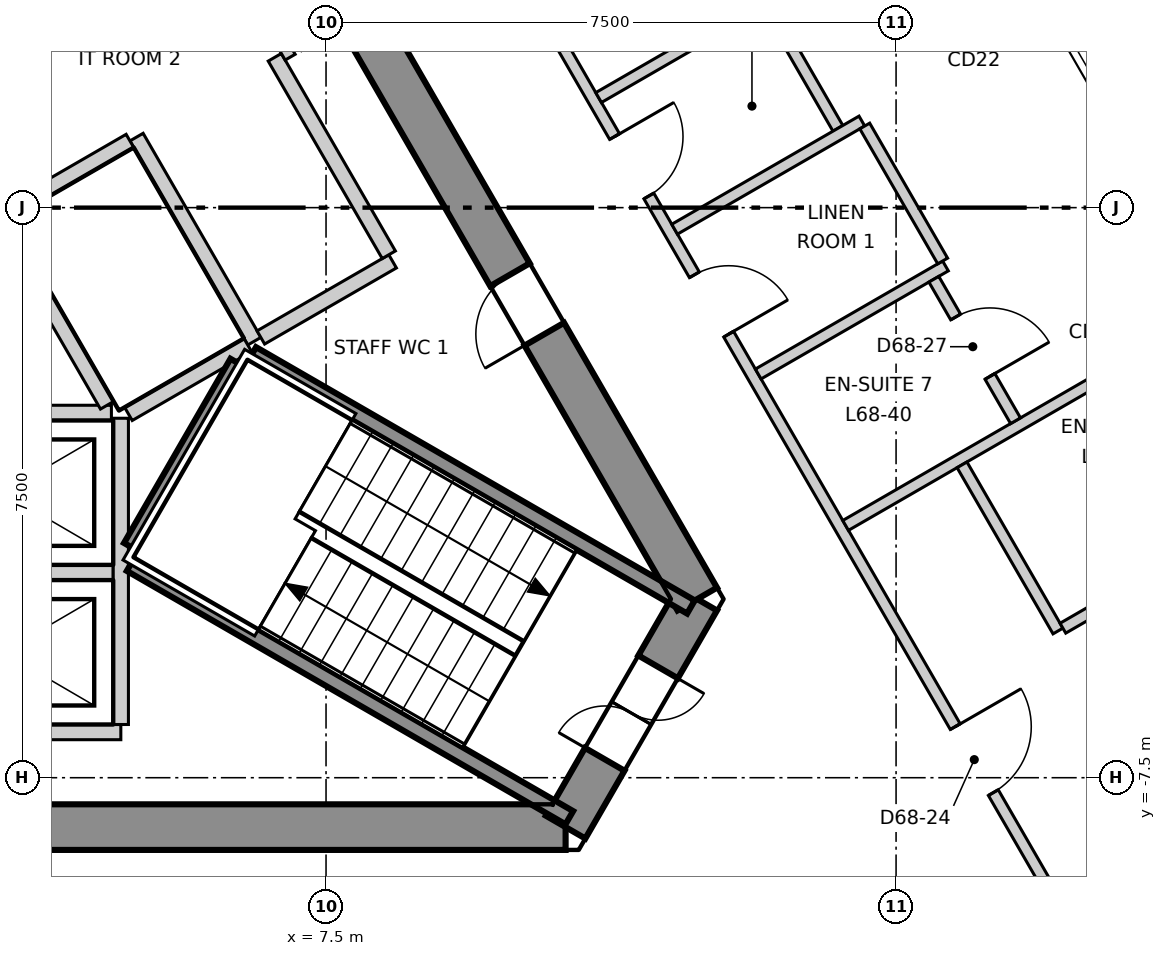
"""IFC4 building model, lengths in metres.
Left out: names, types, materials, properties, quantities, classifications, styles, units other than length and angle.
Written with IfcOpenShell. Run it as: python <this file> out.ifc"""

import sys

from ifc_helpers import new_model, si_unit, direction, frame, frame_2d, origin, place, context, subcontext, project, spatial, polyline, rectangle, outline, extrude, element, fill, save


model = new_model("IFC4")
c1 = context("Model", 3, precision=1e-05, world=origin(), true_north=direction((0.0, 1.0)))
c2 = subcontext(c1, "Body", "Model", "MODEL_VIEW")
j1 = project(units=[si_unit("LENGTHUNIT", "METRE"), si_unit("PLANEANGLEUNIT", "RADIAN")], contexts=[c1])
p1 = place(None, origin())
s1 = spatial("IfcSite", under=j1, at=p1, CompositionType="ELEMENT")
p2 = place(p1, origin())
s2 = spatial("IfcBuilding", under=s1, at=p2, CompositionType="ELEMENT")
p3 = place(p2, frame((0.0, 0.0, 289.9)))
s3 = spatial("IfcBuildingStorey", under=s2, at=p3, CompositionType="ELEMENT", Elevation=289.9)
p4 = place(p3, frame((-10.652, -8.15, -0.3), z_axis=(0.0, 0.0, 1.0), x_axis=(1.0, 0.0, 0.0)))
e1 = element("IfcWall", 1, at=p4, inside=s3, PredefinedType="SHEAR", context=c2, shape_type="SweptSolid", body=[
    extrude(outline(polyline([(-0.173, -0.3), (1.795, -0.3), (3.763, -0.3), (5.731, -0.3), (7.7, -0.3), (9.668, -0.3), (11.636, -0.3), (13.604, -0.3), (15.573, -0.3), (17.541, -0.3), (19.509, -0.3), (21.477, -0.3), (21.131, 0.3), (19.226, 0.3), (17.321, 0.3), (15.415, 0.3), (13.51, 0.3), (11.605, 0.3), (9.699, 0.3), (7.794, 0.3), (5.889, 0.3), (3.984, 0.3), (2.078, 0.3), (0.173, 0.3), (-0.173, -0.3)])), origin(), (0.0, 0.0, 1.0), 3.6),
])
p5 = place(p4, frame((9.752, 0.0, 0.3)))
e2 = element("IfcOpeningElement", 2, at=p5, cuts=e1, PredefinedType="OPENING", context=c2, shape_type="SweptSolid", body=[
    extrude(rectangle(XDim=1.8, YDim=2.1, at=frame_2d((0.9, 1.05))), frame((0.0, 0.31, 0.0), z_axis=(0.0, -1.0, 0.0), x_axis=(1.0, 0.0, 0.0)), (0.0, 0.0, 1.0), 0.62),
])
p6 = place(p4, frame((4.156, 0.0, 0.3)))
e3 = element("IfcOpeningElement", 3, at=p6, cuts=e1, PredefinedType="OPENING", context=c2, shape_type="SweptSolid", body=[
    extrude(rectangle(XDim=0.9, YDim=2.1, at=frame_2d((0.45, 1.05))), frame((0.0, 0.31, 0.0), z_axis=(0.0, -1.0, 0.0), x_axis=(1.0, 0.0, 0.0)), (0.0, 0.0, 1.0), 0.62),
])
p7 = place(p3, frame((10.652, -8.15, -0.3), z_axis=(0.0, 0.0, 1.0), x_axis=(0.49997462182, 0.866040055388, 0.0)))
e4 = element("IfcWall", 4, at=p7, inside=s3, PredefinedType="SHEAR", context=c2, shape_type="SweptSolid", body=[
    extrude(outline(polyline([(-0.173, -0.3), (1.732, -0.301), (3.638, -0.301), (3.291, 0.3), (1.732, 0.3), (0.173, 0.3), (-0.173, -0.3)])), origin(), (0.0, 0.0, 1.0), 3.6),
])
p8 = place(p7, frame((1.032, 0.0, 0.3)))
e5 = element("IfcOpeningElement", 5, at=p8, cuts=e4, PredefinedType="OPENING", context=c2, shape_type="SweptSolid", body=[
    extrude(rectangle(XDim=1.4, YDim=2.1, at=frame_2d((0.7, 1.05))), frame((0.0, 0.31, 0.0), z_axis=(0.0, -1.0, 0.0), x_axis=(1.0, 0.0, 0.0)), (0.0, 0.0, 1.0), 0.621),
])
p9 = place(p3, frame((12.384, -5.15, -0.3), z_axis=(0.0, 0.0, 1.0), x_axis=(-0.500000539815, 0.866025092122, 0.0)))
e6 = element("IfcWall", 6, at=p9, inside=s3, PredefinedType="SHEAR", context=c2, shape_type="SweptSolid", body=[
    extrude(outline(polyline([(-0.173, -0.301), (1.795, -0.301), (3.763, -0.301), (5.731, -0.301), (7.7, -0.301), (9.668, -0.301), (11.636, -0.301), (13.604, -0.3), (15.573, -0.3), (17.541, -0.3), (19.509, -0.3), (21.477, -0.3), (21.131, 0.3), (19.226, 0.3), (17.321, 0.3), (15.415, 0.3), (13.51, 0.3), (11.605, 0.3), (9.699, 0.3), (7.794, 0.3), (5.889, 0.3), (3.984, 0.3), (2.078, 0.3), (0.173, 0.3), (-0.173, -0.301)])), origin(), (0.0, 0.0, 1.0), 3.6),
])
p10 = place(p9, frame((16.378, 0.0, 0.3)))
e7 = element("IfcOpeningElement", 7, at=p10, cuts=e6, PredefinedType="OPENING", context=c2, shape_type="SweptSolid", body=[
    extrude(rectangle(XDim=0.9, YDim=2.1, at=frame_2d((0.45, 1.05))), frame((0.0, 0.31, 0.0), z_axis=(0.0, -1.0, 0.0), x_axis=(1.0, 0.0, 0.0)), (0.0, 0.0, 1.0), 0.621),
])
p11 = place(p9, frame((4.026, 0.0, 0.3)))
e8 = element("IfcOpeningElement", 8, at=p11, cuts=e6, PredefinedType="OPENING", context=c2, shape_type="SweptSolid", body=[
    extrude(rectangle(XDim=0.9, YDim=2.1, at=frame_2d((0.45, 1.05))), frame((0.0, 0.31, 0.0), z_axis=(0.0, -1.0, 0.0), x_axis=(1.0, 0.0, 0.0)), (0.0, 0.0, 1.0), 0.621),
])
p12 = place(p3, frame((25.375, -11.77, 0.0), z_axis=(0.0, 0.0, 1.0), x_axis=(-0.500008134474, 0.866020707292, 0.0)))
e9 = element("IfcWall", 9, at=p12, inside=s3, PredefinedType="ELEMENTEDWALL", context=c2, shape_type="SweptSolid", body=[
    extrude(rectangle(XDim=45.741, YDim=0.2, at=frame_2d((22.871, 0.0))), origin(), (0.0, 0.0, 1.0), 3.3),
])
p13 = place(p12, frame((2.15, 0.0, 0.9)))
e10 = element("IfcOpeningElement", 10, at=p13, cuts=e9, PredefinedType="OPENING", context=c2, shape_type="SweptSolid", body=[
    extrude(rectangle(XDim=3.7, YDim=2.2, at=frame_2d((1.85, 1.1))), frame((0.0, 0.11, 0.0), z_axis=(0.0, -1.0, 0.0), x_axis=(1.0, 0.0, 0.0)), (0.0, 0.0, 1.0), 0.22),
])
p14 = place(p12, frame((7.544, 0.0, 0.9)))
e11 = element("IfcOpeningElement", 11, at=p14, cuts=e9, PredefinedType="OPENING", context=c2, shape_type="SweptSolid", body=[
    extrude(rectangle(XDim=3.7, YDim=2.2, at=frame_2d((1.85, 1.1))), frame((0.0, 0.11, 0.0), z_axis=(0.0, -1.0, 0.0), x_axis=(1.0, 0.0, 0.0)), (0.0, 0.0, 1.0), 0.22),
])
p15 = place(p12, frame((12.939, 0.0, 0.9)))
e12 = element("IfcOpeningElement", 12, at=p15, cuts=e9, PredefinedType="OPENING", context=c2, shape_type="SweptSolid", body=[
    extrude(rectangle(XDim=3.7, YDim=2.2, at=frame_2d((1.85, 1.1))), frame((0.0, 0.11, 0.0), z_axis=(0.0, -1.0, 0.0), x_axis=(1.0, 0.0, 0.0)), (0.0, 0.0, 1.0), 0.22),
])
p16 = place(p12, frame((18.333, 0.0, 0.9)))
e13 = element("IfcOpeningElement", 13, at=p16, cuts=e9, PredefinedType="OPENING", context=c2, shape_type="SweptSolid", body=[
    extrude(rectangle(XDim=3.7, YDim=2.2, at=frame_2d((1.85, 1.1))), frame((0.0, 0.11, 0.0), z_axis=(0.0, -1.0, 0.0), x_axis=(1.0, 0.0, 0.0)), (0.0, 0.0, 1.0), 0.22),
])
p17 = place(p12, frame((23.728, 0.0, 0.9)))
e14 = element("IfcOpeningElement", 14, at=p17, cuts=e9, PredefinedType="OPENING", context=c2, shape_type="SweptSolid", body=[
    extrude(rectangle(XDim=3.7, YDim=2.2, at=frame_2d((1.85, 1.1))), frame((0.0, 0.11, 0.0), z_axis=(0.0, -1.0, 0.0), x_axis=(1.0, 0.0, 0.0)), (0.0, 0.0, 1.0), 0.22),
])
p18 = place(p12, frame((29.122, 0.0, 0.9)))
e15 = element("IfcOpeningElement", 15, at=p18, cuts=e9, PredefinedType="OPENING", context=c2, shape_type="SweptSolid", body=[
    extrude(rectangle(XDim=3.7, YDim=2.2, at=frame_2d((1.85, 1.1))), frame((0.0, 0.11, 0.0), z_axis=(0.0, -1.0, 0.0), x_axis=(1.0, 0.0, 0.0)), (0.0, 0.0, 1.0), 0.22),
])
p19 = place(p12, frame((34.517, 0.0, 0.9)))
e16 = element("IfcOpeningElement", 16, at=p19, cuts=e9, PredefinedType="OPENING", context=c2, shape_type="SweptSolid", body=[
    extrude(rectangle(XDim=3.7, YDim=2.2, at=frame_2d((1.85, 1.1))), frame((0.0, 0.11, 0.0), z_axis=(0.0, -1.0, 0.0), x_axis=(1.0, 0.0, 0.0)), (0.0, 0.0, 1.0), 0.22),
])
p20 = place(p12, frame((39.911, 0.0, 0.9)))
e17 = element("IfcOpeningElement", 17, at=p20, cuts=e9, PredefinedType="OPENING", context=c2, shape_type="SweptSolid", body=[
    extrude(rectangle(XDim=3.7, YDim=2.2, at=frame_2d((1.85, 1.1))), frame((0.0, 0.11, 0.0), z_axis=(0.0, -1.0, 0.0), x_axis=(1.0, 0.0, 0.0)), (0.0, 0.0, 1.0), 0.22),
])
p21 = place(p3, frame((0.075, 20.37, 0.0), z_axis=(0.0, 0.0, 1.0), x_axis=(0.500009775255, -0.866019759965, 0.0)))
e18 = element("IfcWall", 18, at=p21, inside=s3, PredefinedType="PARTITIONING", context=c2, shape_type="SweptSolid", body=[
    extrude(rectangle(XDim=35.207, YDim=0.15, at=frame_2d((17.604, 0.0))), origin(), (0.0, 0.0, 1.0), 3.3),
])
p22 = place(p21, frame((31.407, 0.0, 0.0)))
e19 = element("IfcOpeningElement", 19, at=p22, cuts=e18, PredefinedType="OPENING", context=c2, shape_type="SweptSolid", body=[
    extrude(rectangle(XDim=1.0, YDim=2.1, at=frame_2d((0.5, 1.05))), frame((0.0, 0.085, 0.0), z_axis=(0.0, -1.0, 0.0), x_axis=(1.0, 0.0, 0.0)), (0.0, 0.0, 1.0), 0.17),
])
p23 = place(p21, frame((19.243, 0.0, 0.0)))
e20 = element("IfcOpeningElement", 20, at=p23, cuts=e18, PredefinedType="OPENING", context=c2, shape_type="SweptSolid", body=[
    extrude(rectangle(XDim=1.0, YDim=2.1, at=frame_2d((0.5, 1.05))), frame((0.0, 0.085, 0.0), z_axis=(0.0, -1.0, 0.0), x_axis=(1.0, 0.0, 0.0)), (0.0, 0.0, 1.0), 0.17),
])
p24 = place(p21, frame((24.543, 0.0, 0.0)))
e21 = element("IfcOpeningElement", 21, at=p24, cuts=e18, PredefinedType="OPENING", context=c2, shape_type="SweptSolid", body=[
    extrude(rectangle(XDim=0.9, YDim=2.1, at=frame_2d((0.45, 1.05))), frame((0.0, 0.085, 0.0), z_axis=(0.0, -1.0, 0.0), x_axis=(1.0, 0.0, 0.0)), (0.0, 0.0, 1.0), 0.17),
])
p25 = place(p21, frame((22.443, 0.0, 0.0)))
e22 = element("IfcOpeningElement", 22, at=p25, cuts=e18, PredefinedType="OPENING", context=c2, shape_type="SweptSolid", body=[
    extrude(rectangle(XDim=0.9, YDim=2.1, at=frame_2d((0.45, 1.05))), frame((0.0, 0.085, 0.0), z_axis=(0.0, -1.0, 0.0), x_axis=(1.0, 0.0, 0.0)), (0.0, 0.0, 1.0), 0.17),
])
p26 = place(p21, frame((13.253, 0.0, 0.0)))
e23 = element("IfcOpeningElement", 23, at=p26, cuts=e18, PredefinedType="OPENING", context=c2, shape_type="SweptSolid", body=[
    extrude(rectangle(XDim=1.0, YDim=2.1, at=frame_2d((0.5, 1.05))), frame((0.0, 0.085, 0.0), z_axis=(0.0, -1.0, 0.0), x_axis=(1.0, 0.0, 0.0)), (0.0, 0.0, 1.0), 0.17),
])
p27 = place(p21, frame((5.559, 0.0, 0.0)))
e24 = element("IfcOpeningElement", 24, at=p27, cuts=e18, PredefinedType="OPENING", context=c2, shape_type="SweptSolid", body=[
    extrude(rectangle(XDim=1.0, YDim=2.1, at=frame_2d((0.5, 1.05))), frame((0.0, 0.085, 0.0), z_axis=(0.0, -1.0, 0.0), x_axis=(1.0, 0.0, 0.0)), (0.0, 0.0, 1.0), 0.17),
])
p28 = place(p3, frame((13.273, 2.711, 0.0), z_axis=(0.0, 0.0, 1.0), x_axis=(0.499671230855, -0.86621513555, 0.0)))
e25 = element("IfcWall", 25, at=p28, inside=s3, PredefinedType="PARTITIONING", context=c2, shape_type="SweptSolid", body=[
    extrude(rectangle(XDim=1.926, YDim=0.15, at=frame_2d((0.963, 0.0))), origin(), (0.0, 0.0, 1.0), 3.3),
])
p29 = place(p3, frame((11.086, 1.448, 0.0), z_axis=(0.0, 0.0, 1.0), x_axis=(0.8660395779, 0.499975448907, 0.0)))
e26 = element("IfcWall", 26, at=p29, inside=s3, PredefinedType="PARTITIONING", context=c2, shape_type="SweptSolid", body=[
    extrude(rectangle(XDim=2.45, YDim=0.15, at=frame_2d((1.225, 0.0))), origin(), (0.0, 0.0, 1.0), 3.3),
])
p30 = place(p3, frame((12.086, -0.284, 0.0), z_axis=(0.0, 0.0, 1.0), x_axis=(0.865995540999, 0.500051720295, 0.0)))
e27 = element("IfcWall", 27, at=p30, inside=s3, PredefinedType="PARTITIONING", context=c2, shape_type="SweptSolid", body=[
    extrude(rectangle(XDim=2.845, YDim=0.15, at=frame_2d((1.423, 0.0))), origin(), (0.0, 0.0, 1.0), 3.3),
])
p31 = place(p3, frame((13.186, -2.189, 0.0), z_axis=(0.0, 0.0, 1.0), x_axis=(0.866122712398, 0.499831418649, 0.0)))
e28 = element("IfcWall", 28, at=p31, inside=s3, PredefinedType="PARTITIONING", context=c2, shape_type="SweptSolid", body=[
    extrude(rectangle(XDim=2.845, YDim=0.15, at=frame_2d((1.422, 0.0))), origin(), (0.0, 0.0, 1.0), 3.3),
])
p32 = place(p3, frame((14.336, -4.181, 0.0), z_axis=(0.0, 0.0, 1.0), x_axis=(0.86606758311, 0.499926936147, 0.0)))
e29 = element("IfcWall", 29, at=p32, inside=s3, PredefinedType="PARTITIONING", context=c2, shape_type="SweptSolid", body=[
    extrude(rectangle(XDim=5.684, YDim=0.15, at=frame_2d((2.842, 0.0))), origin(), (0.0, 0.0, 1.0), 3.3),
])
p33 = place(p3, frame((14.588, 1.074, 0.0), z_axis=(0.0, 0.0, 1.0), x_axis=(0.499942325911, -0.866058699375, 0.0)))
e30 = element("IfcWall", 30, at=p33, inside=s3, PredefinedType="PARTITIONING", context=c2, shape_type="SweptSolid", body=[
    extrude(rectangle(XDim=2.051, YDim=0.15, at=frame_2d((1.025, 0.0))), origin(), (0.0, 0.0, 1.0), 3.3),
])
p34 = place(p3, frame((15.497, -0.942, 0.0), z_axis=(0.0, 0.0, 1.0), x_axis=(0.499961633463, -0.866047553582, 0.0)))
e31 = element("IfcWall", 31, at=p34, inside=s3, PredefinedType="PARTITIONING", context=c2, shape_type="SweptSolid", body=[
    extrude(rectangle(XDim=2.15, YDim=0.15, at=frame_2d((1.075, 0.0))), origin(), (0.0, 0.0, 1.0), 3.3),
])
p35 = place(p34, frame((0.575, 0.0, 0.0)))
e32 = element("IfcOpeningElement", 32, at=p35, cuts=e31, PredefinedType="OPENING", context=c2, shape_type="SweptSolid", body=[
    extrude(rectangle(XDim=0.9, YDim=2.1, at=frame_2d((0.45, 1.05))), frame((0.0, 0.085, 0.0), z_axis=(0.0, -1.0, 0.0), x_axis=(1.0, 0.0, 0.0)), (0.0, 0.0, 1.0), 0.17),
])
p36 = place(p3, frame((15.868, -3.384, 0.0), z_axis=(0.0, 0.0, 1.0), x_axis=(0.499956887143, -0.866050293573, 0.0)))
e33 = element("IfcWall", 33, at=p36, inside=s3, PredefinedType="PARTITIONING", context=c2, shape_type="SweptSolid", body=[
    extrude(rectangle(XDim=2.524, YDim=0.15, at=frame_2d((1.262, 0.0))), origin(), (0.0, 0.0, 1.0), 3.3),
])
p37 = place(p3, frame((17.195, -5.533, 0.0), z_axis=(0.0, 0.0, 1.0), x_axis=(0.866027073272, 0.499997108352, 0.0)))
e34 = element("IfcWall", 34, at=p37, inside=s3, PredefinedType="PARTITIONING", context=c2, shape_type="SweptSolid", body=[
    extrude(rectangle(XDim=2.77, YDim=0.15, at=frame_2d((1.385, 0.0))), origin(), (0.0, 0.0, 1.0), 3.3),
])
p38 = place(p37, frame((0.895, 0.0, 0.0)))
e35 = element("IfcOpeningElement", 35, at=p38, cuts=e34, PredefinedType="OPENING", context=c2, shape_type="SweptSolid", body=[
    extrude(rectangle(XDim=0.9, YDim=2.1, at=frame_2d((0.45, 1.05))), frame((0.0, 0.085, 0.0), z_axis=(0.0, -1.0, 0.0), x_axis=(1.0, 0.0, 0.0)), (0.0, 0.0, 1.0), 0.17),
])
p39 = place(p3, frame((1.8, -6.9, 0.0), z_axis=(0.0, 0.0, 1.0), x_axis=(1.0, 0.0, 0.0)))
e36 = element("IfcWall", 36, at=p39, inside=s3, PredefinedType="SOLIDWALL", context=c2, shape_type="SweptSolid", body=[
    extrude(rectangle(XDim=3.0, YDim=0.2, at=frame_2d((1.5, 0.0))), origin(), (0.0, 0.0, 1.0), 3.3),
])
p40 = place(p3, frame((1.8, -4.8, 0.0), z_axis=(0.0, 0.0, 1.0), x_axis=(1.0, 0.0, 0.0)))
e37 = element("IfcWall", 37, at=p40, inside=s3, PredefinedType="SOLIDWALL", context=c2, shape_type="SweptSolid", body=[
    extrude(rectangle(XDim=2.9, YDim=0.2, at=frame_2d((1.45, 0.0))), origin(), (0.0, 0.0, 1.0), 3.3),
])
p41 = place(p3, frame((1.703, -2.7, 0.0), z_axis=(0.0, 0.0, 1.0), x_axis=(1.0, 0.0, 0.0)))
e38 = element("IfcWall", 38, at=p41, inside=s3, PredefinedType="SOLIDWALL", context=c2, shape_type="SweptSolid", body=[
    extrude(rectangle(XDim=2.973, YDim=0.2, at=frame_2d((1.487, 0.0))), origin(), (0.0, 0.0, 1.0), 3.3),
])
p42 = place(p41, frame((0.936, 0.0, 0.0)))
e39 = element("IfcOpeningElement", 39, at=p42, cuts=e38, PredefinedType="OPENING", context=c2, shape_type="SweptSolid", body=[
    extrude(rectangle(XDim=1.1, YDim=2.1, at=frame_2d((0.55, 1.05))), frame((0.0, 0.11, 0.0), z_axis=(0.0, -1.0, 0.0), x_axis=(1.0, 0.0, 0.0)), (0.0, 0.0, 1.0), 0.22),
])
p43 = place(p3, frame((3.19, -0.125, 0.0), z_axis=(0.0, 0.0, 1.0), x_axis=(0.499988658015, -0.866031951983, 0.0)))
e40 = element("IfcWall", 40, at=p43, inside=s3, PredefinedType="SOLIDWALL", context=c2, shape_type="SweptSolid", body=[
    extrude(rectangle(XDim=2.858, YDim=0.2, at=frame_2d((1.429, 0.0))), origin(), (0.0, 0.0, 1.0), 3.3),
])
p44 = place(p3, frame((4.8, -6.8, 0.0), z_axis=(0.0, 0.0, 1.0), x_axis=(0.0, 1.0, 0.0)))
e41 = element("IfcWall", 41, at=p44, inside=s3, PredefinedType="SOLIDWALL", context=c2, shape_type="SweptSolid", body=[
    extrude(rectangle(XDim=4.029, YDim=0.2, at=frame_2d((2.015, 0.0))), origin(), (0.0, 0.0, 1.0), 3.3),
])
p45 = place(p3, frame((5.007, 0.928, 0.0), z_axis=(0.0, 0.0, 1.0), x_axis=(0.499899694197, -0.866083307622, 0.0)))
e42 = element("IfcWall", 42, at=p45, inside=s3, PredefinedType="SOLIDWALL", context=c2, shape_type="SweptSolid", body=[
    extrude(rectangle(XDim=3.1, YDim=0.2, at=frame_2d((1.55, 0.0))), origin(), (0.0, 0.0, 1.0), 3.3),
])
p46 = place(p3, frame((3.278, -0.071, 0.0), z_axis=(0.0, 0.0, 1.0), x_axis=(0.865784509405, 0.500417009377, 0.0)))
e43 = element("IfcWall", 43, at=p46, inside=s3, PredefinedType="SOLIDWALL", context=c2, shape_type="SweptSolid", body=[
    extrude(rectangle(XDim=1.896, YDim=0.2, at=frame_2d((0.948, 0.0))), origin(), (0.0, 0.0, 1.0), 3.3),
])
p47 = place(p3, frame((2.275, 1.66, 0.0), z_axis=(0.0, 0.0, 1.0), x_axis=(0.866013608182, 0.500020430026, 0.0)))
e44 = element("IfcWall", 44, at=p47, inside=s3, PredefinedType="SOLIDWALL", context=c2, shape_type="SweptSolid", body=[
    extrude(rectangle(XDim=4.35, YDim=0.2, at=frame_2d((2.175, 0.0))), origin(), (0.0, 0.0, 1.0), 3.3),
])
p48 = place(p3, frame((4.9, -2.714, 0.0), z_axis=(0.0, 0.0, 1.0), x_axis=(0.865846928409, 0.500309001083, 0.0)))
e45 = element("IfcWall", 45, at=p48, inside=s3, PredefinedType="SOLIDWALL", context=c2, shape_type="SweptSolid", body=[
    extrude(rectangle(XDim=1.813, YDim=0.2, at=frame_2d((0.907, 0.0))), origin(), (0.0, 0.0, 1.0), 3.3),
])
p49 = place(p3, frame((6.642, -1.708, 0.0), z_axis=(0.0, 0.0, 1.0), x_axis=(0.866043441391, 0.499968756647, 0.0)))
e46 = element("IfcWall", 46, at=p49, inside=s3, PredefinedType="SOLIDWALL", context=c2, shape_type="SweptSolid", body=[
    extrude(rectangle(XDim=2.002, YDim=0.2, at=frame_2d((1.001, 0.0))), origin(), (0.0, 0.0, 1.0), 3.3),
])
p50 = place(p3, frame((6.826, 1.978, 0.0), z_axis=(0.0, 0.0, 1.0), x_axis=(0.499990139034, -0.866031096941, 0.0)))
e47 = element("IfcWall", 47, at=p50, inside=s3, PredefinedType="SOLIDWALL", context=c2, shape_type="SweptSolid", body=[
    extrude(rectangle(XDim=3.0, YDim=0.2, at=frame_2d((1.5, 0.0))), origin(), (0.0, 0.0, 1.0), 3.3),
])
p51 = place(p3, frame((6.912, 2.028, 0.0), z_axis=(0.0, 0.0, 1.0), x_axis=(0.866559367082, 0.499074005857, 0.0)))
e48 = element("IfcWall", 48, at=p51, inside=s3, PredefinedType="SOLIDWALL", context=c2, shape_type="SweptSolid", body=[
    extrude(rectangle(XDim=0.152, YDim=0.2, at=frame_2d((0.076, 0.0))), origin(), (0.0, 0.0, 1.0), 3.3),
])
p52 = place(p3, frame((4.929, -4.693, 0.0), z_axis=(0.0, 0.0, 1.0), x_axis=(0.866005022404, -0.500035299925, 0.0)))
e49 = element("IfcWall", 49, at=p52, inside=s3, PredefinedType="SOLIDWALL", context=c2, shape_type="SweptSolid", body=[
    extrude(rectangle(XDim=6.665, YDim=0.2, at=frame_2d((3.333, 0.0))), origin(), (0.0, 0.0, 1.0), 3.3),
])
p53 = place(p3, frame((4.929, -4.462, 0.0), z_axis=(0.0, 0.0, 1.0), x_axis=(0.500200581029, 0.865909567298, 0.0)))
e50 = element("IfcWall", 50, at=p53, inside=s3, PredefinedType="SOLIDWALL", context=c2, shape_type="SweptSolid", body=[
    extrude(rectangle(XDim=2.799, YDim=0.2, at=frame_2d((1.399, 0.0))), origin(), (0.0, 0.0, 1.0), 3.3),
])
p54 = place(p3, frame((6.529, -1.922, 0.0), z_axis=(0.0, 0.0, 1.0), x_axis=(0.866068467981, -0.499925403204, 0.0)))
e51 = element("IfcWall", 51, at=p54, inside=s3, PredefinedType="SOLIDWALL", context=c2, shape_type="SweptSolid", body=[
    extrude(rectangle(XDim=6.665, YDim=0.2, at=frame_2d((3.332, 0.0))), origin(), (0.0, 0.0, 1.0), 3.3),
])
p55 = place(p15, origin())
e52 = element("IfcWindow", 52, at=p55, inside=s3, PartitioningType="SINGLE_PANEL", PredefinedType="WINDOW", context=c2, shape_type="SweptSolid", body=[
    extrude(rectangle(XDim=3.7, YDim=2.2, at=frame_2d((1.85, 1.1))), frame((0.0, 0.03, 0.0), z_axis=(0.0, -1.0, 0.0), x_axis=(1.0, 0.0, 0.0)), (0.0, 0.0, 1.0), 0.06),
])
fill(e12, e52)
p56 = place(p22, origin())
e53 = element("IfcDoor", 53, at=p56, inside=s3, OperationType="SINGLE_SWING_RIGHT", PredefinedType="DOOR", context=c2, shape_type="SweptSolid", body=[
    extrude(rectangle(XDim=1.0, YDim=2.1, at=frame_2d((0.5, 1.05))), frame((0.0, 0.025, 0.0), z_axis=(0.0, -1.0, 0.0), x_axis=(1.0, 0.0, 0.0)), (0.0, 0.0, 1.0), 0.05),
])
fill(e19, e53)
p57 = place(p35, origin())
e54 = element("IfcDoor", 54, at=p57, inside=s3, OperationType="SINGLE_SWING_LEFT", PredefinedType="DOOR", context=c2, shape_type="SweptSolid", body=[
    extrude(rectangle(XDim=0.9, YDim=2.1, at=frame_2d((0.45, 1.05))), frame((0.0, 0.025, 0.0), z_axis=(0.0, -1.0, 0.0), x_axis=(1.0, 0.0, 0.0)), (0.0, 0.0, 1.0), 0.05),
])
fill(e32, e54)
p58 = place(p24, origin())
e55 = element("IfcDoor", 55, at=p58, inside=s3, OperationType="SINGLE_SWING_LEFT", PredefinedType="DOOR", context=c2, shape_type="SweptSolid", body=[
    extrude(rectangle(XDim=0.9, YDim=2.1, at=frame_2d((0.45, 1.05))), frame((0.0, 0.025, 0.0), z_axis=(0.0, -1.0, 0.0), x_axis=(1.0, 0.0, 0.0)), (0.0, 0.0, 1.0), 0.05),
])
fill(e21, e55)
p59 = place(p25, origin())
e56 = element("IfcDoor", 56, at=p59, inside=s3, OperationType="SINGLE_SWING_RIGHT", PredefinedType="DOOR", context=c2, shape_type="SweptSolid", body=[
    extrude(rectangle(XDim=0.9, YDim=2.1, at=frame_2d((0.45, 1.05))), frame((0.0, 0.025, 0.0), z_axis=(0.0, -1.0, 0.0), x_axis=(1.0, 0.0, 0.0)), (0.0, 0.0, 1.0), 0.05),
])
fill(e22, e56)
p60 = place(p8, origin())
e57 = element("IfcDoor", 57, at=p60, inside=s3, OperationType="DOUBLE_DOOR_SINGLE_SWING", PredefinedType="DOOR", context=c2, shape_type="SweptSolid", body=[
    extrude(rectangle(XDim=1.4, YDim=2.1, at=frame_2d((0.7, 1.05))), frame((0.0, 0.025, 0.0), z_axis=(0.0, -1.0, 0.0), x_axis=(1.0, 0.0, 0.0)), (0.0, 0.0, 1.0), 0.05),
])
fill(e5, e57)
p61 = place(p11, origin())
e58 = element("IfcDoor", 58, at=p61, inside=s3, OperationType="SINGLE_SWING_RIGHT", PredefinedType="DOOR", context=c2, shape_type="SweptSolid", body=[
    extrude(rectangle(XDim=0.9, YDim=2.1, at=frame_2d((0.45, 1.05))), frame((0.0, 0.025, 0.0), z_axis=(0.0, -1.0, 0.0), x_axis=(1.0, 0.0, 0.0)), (0.0, 0.0, 1.0), 0.05),
])
fill(e8, e58)
save(model, sys.argv[1])
